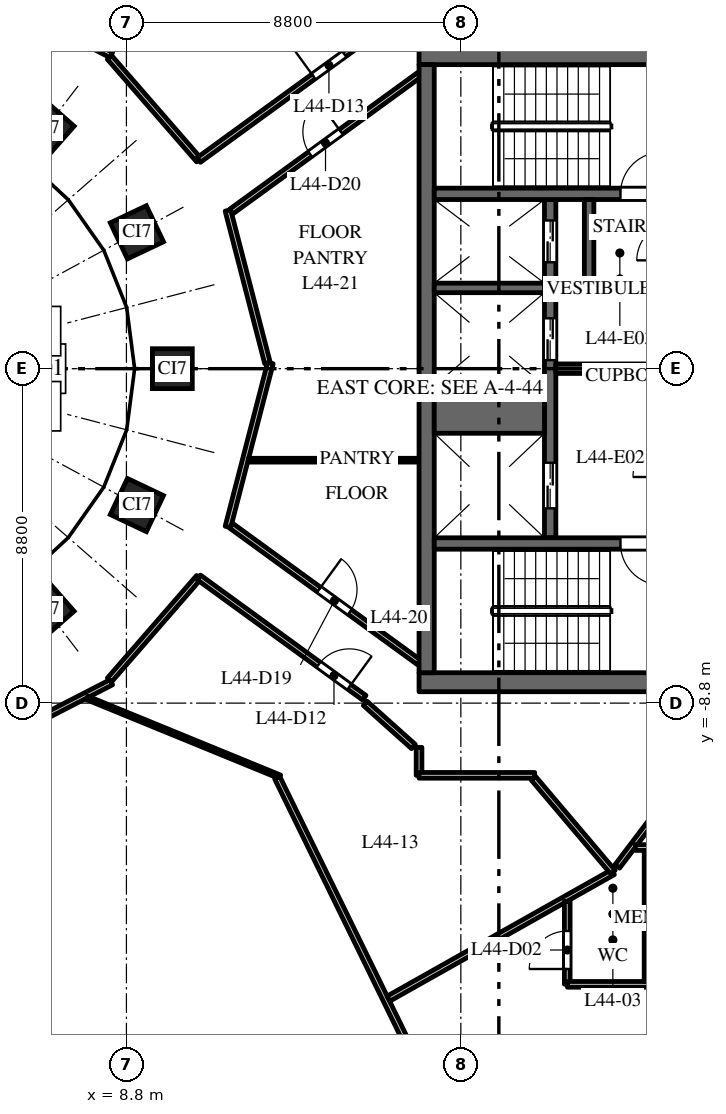
"""IFC4 building model, lengths in metres.
Left out: names, types, materials, properties, quantities, classifications, styles, units other than length and angle.
Written with IfcOpenShell. Run it as: python <this file> out.ifc"""

import sys

from ifc_helpers import new_model, si_unit, direction, frame, frame_2d, origin, origin_2d, place, context, subcontext, project, spatial, rectangle, extrude, element, fill, save


model = new_model("IFC4")
c1 = context("Model", 3, precision=1e-05, world=origin(), true_north=direction((0.0, 1.0)))
c2 = subcontext(c1, "Body", "Model", "MODEL_VIEW")
j1 = project(units=[si_unit("LENGTHUNIT", "METRE"), si_unit("PLANEANGLEUNIT", "RADIAN")], contexts=[c1])
p1 = place(None, origin())
s1 = spatial("IfcSite", under=j1, at=p1, CompositionType="ELEMENT")
p2 = place(p1, origin())
s2 = spatial("IfcBuilding", under=s1, at=p2, CompositionType="ELEMENT")
p3 = place(p2, frame((0.0, 0.0, 190.0)))
s3 = spatial("IfcBuildingStorey", under=s2, at=p3, CompositionType="ELEMENT", Elevation=190.0)
for number, where, z_axis, x_axis in (
    (1, (10.008, 0.0, 0.0), (0.0, 0.0, 1.0), (0.0, 1.0, 0.0)),
    (2, (9.076, 3.588, 0.0), (0.0, 0.0, 1.0), (-0.429, 0.903, 0.0)),
    (3, (6.682, 6.334, 0.0), (0.0, 0.0, 1.0), (-0.751, 0.66, 0.0)),
    (4, (6.682, -6.334, 0.0), (0.0, 0.0, 1.0), (0.751, 0.66, 0.0)),
    (5, (9.076, -3.588, 0.0), (0.0, 0.0, 1.0), (0.429, 0.903, 0.0)),
):
    element("IfcColumn", number, at=place(p3, frame(where, z_axis=z_axis, x_axis=x_axis)), inside=s3, PredefinedType="COLUMN", context=c2, shape_type="SweptSolid", body=[
        extrude(rectangle(XDim=1.05, YDim=1.05, at=origin_2d()), origin(), (0.0, 0.0, 1.0), 4.0),
    ])
p4 = place(p3, frame((16.5, 8.25, 0.0), z_axis=(0.0, 0.0, 1.0), x_axis=(1.0, 0.0, 0.0)))
e6 = element("IfcWall", 6, at=p4, inside=s3, PredefinedType="SHEAR", context=c2, shape_type="SweptSolid", body=[
    extrude(rectangle(XDim=15.0, YDim=0.5, at=frame_2d((7.5, 0.0))), origin(), (0.0, 0.0, 1.0), 3.7),
])
p5 = place(p4, frame((6.9, 0.0, 0.0)))
e7 = element("IfcOpeningElement", 7, at=p5, cuts=e6, PredefinedType="OPENING", context=c2, shape_type="SweptSolid", body=[
    extrude(rectangle(XDim=1.2, YDim=2.1, at=frame_2d((0.6, 1.05))), frame((0.0, 0.26, 0.0), z_axis=(0.0, -1.0, 0.0), x_axis=(1.0, 0.0, 0.0)), (0.0, 0.0, 1.0), 0.52),
])
p6 = place(p4, frame((12.425, 0.0, 0.0)))
e8 = element("IfcOpeningElement", 8, at=p6, cuts=e6, PredefinedType="OPENING", context=c2, shape_type="SweptSolid", body=[
    extrude(rectangle(XDim=0.9, YDim=2.1, at=frame_2d((0.45, 1.05))), frame((0.0, 0.26, 0.0), z_axis=(0.0, -1.0, 0.0), x_axis=(1.0, 0.0, 0.0)), (0.0, 0.0, 1.0), 0.52),
])
p7 = place(p3, frame((16.5, -8.25, 0.0), z_axis=(0.0, 0.0, 1.0), x_axis=(1.0, 0.0, 0.0)))
e9 = element("IfcWall", 9, at=p7, inside=s3, PredefinedType="SHEAR", context=c2, shape_type="SweptSolid", body=[
    extrude(rectangle(XDim=15.0, YDim=0.5, at=frame_2d((7.5, 0.0))), origin(), (0.0, 0.0, 1.0), 3.7),
])
p8 = place(p7, frame((6.9, 0.0, 0.0)))
e10 = element("IfcOpeningElement", 10, at=p8, cuts=e9, PredefinedType="OPENING", context=c2, shape_type="SweptSolid", body=[
    extrude(rectangle(XDim=1.2, YDim=2.1, at=frame_2d((0.6, 1.05))), frame((0.0, 0.26, 0.0), z_axis=(0.0, -1.0, 0.0), x_axis=(1.0, 0.0, 0.0)), (0.0, 0.0, 1.0), 0.52),
])
p9 = place(p7, frame((12.05, 0.0, 0.0)))
e11 = element("IfcOpeningElement", 11, at=p9, cuts=e9, PredefinedType="OPENING", context=c2, shape_type="SweptSolid", body=[
    extrude(rectangle(XDim=0.9, YDim=2.1, at=frame_2d((0.45, 1.05))), frame((0.0, 0.26, 0.0), z_axis=(0.0, -1.0, 0.0), x_axis=(1.0, 0.0, 0.0)), (0.0, 0.0, 1.0), 0.52),
])
p10 = place(p3, frame((19.95, -4.45, 0.0), z_axis=(0.0, 0.0, 1.0), x_axis=(0.0, 1.0, 0.0)))
e12 = element("IfcWall", 12, at=p10, inside=s3, PredefinedType="SHEAR", context=c2, shape_type="SweptSolid", body=[
    extrude(rectangle(XDim=8.9, YDim=0.3, at=frame_2d((4.45, 0.0))), origin(), (0.0, 0.0, 1.0), 3.7),
])
p11 = place(p10, frame((0.775, 0.0, 0.0)))
e13 = element("IfcOpeningElement", 13, at=p11, cuts=e12, PredefinedType="OPENING", context=c2, shape_type="SweptSolid", body=[
    extrude(rectangle(XDim=1.2, YDim=2.1, at=frame_2d((0.6, 1.05))), frame((0.0, 0.16, 0.0), z_axis=(0.0, -1.0, 0.0), x_axis=(1.0, 0.0, 0.0)), (0.0, 0.0, 1.0), 0.32),
])
p12 = place(p10, frame((4.675, 0.0, 0.0)))
e14 = element("IfcOpeningElement", 14, at=p12, cuts=e12, PredefinedType="OPENING", context=c2, shape_type="SweptSolid", body=[
    extrude(rectangle(XDim=1.1, YDim=2.1, at=frame_2d((0.55, 1.05))), frame((0.0, 0.16, 0.0), z_axis=(0.0, -1.0, 0.0), x_axis=(1.0, 0.0, 0.0)), (0.0, 0.0, 1.0), 0.32),
])
p13 = place(p10, frame((7.25, 0.0, 0.0)))
e15 = element("IfcOpeningElement", 15, at=p13, cuts=e12, PredefinedType="OPENING", context=c2, shape_type="SweptSolid", body=[
    extrude(rectangle(XDim=1.1, YDim=2.1, at=frame_2d((0.55, 1.05))), frame((0.0, 0.16, 0.0), z_axis=(0.0, -1.0, 0.0), x_axis=(1.0, 0.0, 0.0)), (0.0, 0.0, 1.0), 0.32),
])
p14 = place(p3, frame((20.1, 0.0, 0.0), z_axis=(0.0, 0.0, 1.0), x_axis=(1.0, 0.0, 0.0)))
e16 = element("IfcWall", 16, at=p14, inside=s3, PredefinedType="SHEAR", context=c2, shape_type="SweptSolid", body=[
    extrude(rectangle(XDim=3.28, YDim=0.25, at=frame_2d((1.64, 0.0))), origin(), (0.0, 0.0, 1.0), 3.7),
])
p15 = place(p3, frame((16.7, -8.0, 0.0), z_axis=(0.0, 0.0, 1.0), x_axis=(0.0, 1.0, 0.0)))
e17 = element("IfcWall", 17, at=p15, inside=s3, PredefinedType="SHEAR", context=c2, shape_type="SweptSolid", body=[
    extrude(rectangle(XDim=16.0, YDim=0.4, at=frame_2d((8.0, 0.0))), origin(), (0.0, 0.0, 1.0), 3.7),
])
p16 = place(p3, frame((16.9, -1.075, 0.0), z_axis=(0.0, 0.0, 1.0), x_axis=(1.0, 0.0, 0.0)))
e18 = element("IfcWall", 18, at=p16, inside=s3, PredefinedType="SHEAR", context=c2, shape_type="SweptSolid", body=[
    extrude(rectangle(XDim=2.9, YDim=1.25, at=frame_2d((1.45, 0.0))), origin(), (0.0, 0.0, 1.0), 3.7),
])
p17 = place(p3, frame((16.9, 2.125, 0.0), z_axis=(0.0, 0.0, 1.0), x_axis=(1.0, 0.0, 0.0)))
e19 = element("IfcWall", 19, at=p17, inside=s3, PredefinedType="SHEAR", context=c2, shape_type="SweptSolid", body=[
    extrude(rectangle(XDim=2.9, YDim=0.25, at=frame_2d((1.45, 0.0))), origin(), (0.0, 0.0, 1.0), 3.7),
])
p18 = place(p3, frame((16.9, 4.6, 0.0), z_axis=(0.0, 0.0, 1.0), x_axis=(1.0, 0.0, 0.0)))
e20 = element("IfcWall", 20, at=p18, inside=s3, PredefinedType="SHEAR", context=c2, shape_type="SweptSolid", body=[
    extrude(rectangle(XDim=6.18, YDim=0.3, at=frame_2d((3.09, 0.0))), origin(), (0.0, 0.0, 1.0), 3.7),
])
p19 = place(p18, frame((4.9, 0.0, 0.0)))
e21 = element("IfcOpeningElement", 21, at=p19, cuts=e20, PredefinedType="OPENING", context=c2, shape_type="SweptSolid", body=[
    extrude(rectangle(XDim=1.1, YDim=2.1, at=frame_2d((0.55, 1.05))), frame((0.0, 0.16, 0.0), z_axis=(0.0, -1.0, 0.0), x_axis=(1.0, 0.0, 0.0)), (0.0, 0.0, 1.0), 0.32),
])
p20 = place(p3, frame((16.9, -4.6, 0.0), z_axis=(0.0, 0.0, 1.0), x_axis=(1.0, 0.0, 0.0)))
e22 = element("IfcWall", 22, at=p20, inside=s3, PredefinedType="SHEAR", context=c2, shape_type="SweptSolid", body=[
    extrude(rectangle(XDim=6.18, YDim=0.3, at=frame_2d((3.09, 0.0))), origin(), (0.0, 0.0, 1.0), 3.7),
])
p21 = place(p20, frame((4.9, 0.0, 0.0)))
e23 = element("IfcOpeningElement", 23, at=p21, cuts=e22, PredefinedType="OPENING", context=c2, shape_type="SweptSolid", body=[
    extrude(rectangle(XDim=1.1, YDim=2.1, at=frame_2d((0.55, 1.05))), frame((0.0, 0.16, 0.0), z_axis=(0.0, -1.0, 0.0), x_axis=(1.0, 0.0, 0.0)), (0.0, 0.0, 1.0), 0.32),
])
p22 = place(p3, frame((20.85, 2.125, 0.0), z_axis=(0.0, 0.0, 1.0), x_axis=(1.0, 0.0, 0.0)))
e24 = element("IfcWall", 24, at=p22, inside=s3, PredefinedType="SHEAR", context=c2, shape_type="SweptSolid", body=[
    extrude(rectangle(XDim=2.53, YDim=0.25, at=frame_2d((1.265, 0.0))), origin(), (0.0, 0.0, 1.0), 3.7),
])
p23 = place(p3, frame((20.975, 2.25, 0.0), z_axis=(0.0, 0.0, 1.0), x_axis=(0.0, 1.0, 0.0)))
e25 = element("IfcWall", 25, at=p23, inside=s3, PredefinedType="SHEAR", context=c2, shape_type="SweptSolid", body=[
    extrude(rectangle(XDim=2.2, YDim=0.25, at=frame_2d((1.1, 0.0))), origin(), (0.0, 0.0, 1.0), 3.7),
])
for number, where, z_axis, x_axis in (
    (26, (4.459, -10.278, 0.0), (0.0, 0.0, 1.0), (0.889, 0.457, 0.0)),
    (27, (4.459, 10.278, 0.0), (0.0, 0.0, 1.0), (0.889, -0.457, 0.0)),
):
    element("IfcWall", number, at=place(p3, frame(where, z_axis=z_axis, x_axis=x_axis)), inside=s3, PredefinedType="PARTITIONING", context=c2, shape_type="SweptSolid", body=[
        extrude(rectangle(XDim=4.434, YDim=0.15, at=frame_2d((2.217, 0.0))), origin(), (0.0, 0.0, 1.0), 2.85),
    ])
p24 = place(p3, frame((7.765, -8.662, 0.0), z_axis=(0.0, 0.0, 1.0), x_axis=(0.925440549198, -0.378892847519, 0.0)))
e28 = element("IfcWall", 28, at=p24, inside=s3, PredefinedType="PARTITIONING", context=c2, shape_type="SweptSolid", body=[
    extrude(rectangle(XDim=5.484, YDim=0.1, at=frame_2d((2.742, 0.0))), origin(), (0.0, 0.0, 1.0), 3.7),
])
for number, where, z_axis, x_axis in (
    (29, (8.355, -8.19, 0.0), (0.0, 0.0, 1.0), (0.656, 0.754, 0.0)),
    (30, (8.355, 8.19, 0.0), (0.0, 0.0, 1.0), (0.656, -0.754, 0.0)),
):
    element("IfcWall", number, at=place(p3, frame(where, z_axis=z_axis, x_axis=x_axis)), inside=s3, PredefinedType="PARTITIONING", context=c2, shape_type="SweptSolid", body=[
        extrude(rectangle(XDim=3.577, YDim=0.15, at=frame_2d((1.789, 0.0))), origin(), (0.0, 0.0, 1.0), 2.75),
    ])
p25 = place(p3, frame((10.703, -5.491, 0.0), z_axis=(0.0, 0.0, 1.0), x_axis=(0.808838005268, -0.588031530816, 0.0)))
e31 = element("IfcWall", 31, at=p25, inside=s3, PredefinedType="PARTITIONING", context=c2, shape_type="SweptSolid", body=[
    extrude(rectangle(XDim=5.386, YDim=0.15, at=frame_2d((2.693, 0.0))), origin(), (0.0, 0.0, 1.0), 2.75),
])
p26 = place(p25, frame((3.9, 0.0, 0.0)))
e32 = element("IfcOpeningElement", 32, at=p26, cuts=e31, PredefinedType="OPENING", context=c2, shape_type="SweptSolid", body=[
    extrude(rectangle(XDim=1.0, YDim=2.1, at=frame_2d((0.5, 1.05))), frame((0.0, 0.085, 0.0), z_axis=(0.0, -1.0, 0.0), x_axis=(1.0, 0.0, 0.0)), (0.0, 0.0, 1.0), 0.17),
])
p27 = place(p3, frame((10.703, 5.491, 0.0), z_axis=(0.0, 0.0, 1.0), x_axis=(0.808838005268, 0.588031530816, 0.0)))
e33 = element("IfcWall", 33, at=p27, inside=s3, PredefinedType="PARTITIONING", context=c2, shape_type="SweptSolid", body=[
    extrude(rectangle(XDim=5.386, YDim=0.15, at=frame_2d((2.693, 0.0))), origin(), (0.0, 0.0, 1.0), 2.75),
])
p28 = place(p27, frame((3.736, 0.0, 0.0)))
e34 = element("IfcOpeningElement", 34, at=p28, cuts=e33, PredefinedType="OPENING", context=c2, shape_type="SweptSolid", body=[
    extrude(rectangle(XDim=1.0, YDim=2.1, at=frame_2d((0.5, 1.05))), frame((0.0, 0.085, 0.0), z_axis=(0.0, -1.0, 0.0), x_axis=(1.0, 0.0, 0.0)), (0.0, 0.0, 1.0), 0.17),
])
p29 = place(p3, frame((11.471, -4.164, 0.0), z_axis=(0.0, 0.0, 1.0), x_axis=(0.250958355571, 0.967997884176, 0.0)))
e35 = element("IfcWall", 35, at=p29, inside=s3, PredefinedType="PARTITIONING", context=c2, shape_type="SweptSolid", body=[
    extrude(rectangle(XDim=4.456, YDim=0.15, at=frame_2d((2.228, 0.0))), origin(), (0.0, 0.0, 1.0), 3.7),
])
p30 = place(p3, frame((11.556, -4.133, 0.0), z_axis=(0.0, 0.0, 1.0), x_axis=(0.808869060288, -0.587988812231, 0.0)))
e36 = element("IfcWall", 36, at=p30, inside=s3, PredefinedType="PARTITIONING", context=c2, shape_type="SweptSolid", body=[
    extrude(rectangle(XDim=6.112, YDim=0.15, at=frame_2d((3.056, 0.0))), origin(), (0.0, 0.0, 1.0), 3.7),
])
p31 = place(p30, frame((2.858, 0.0, 0.0)))
e37 = element("IfcOpeningElement", 37, at=p31, cuts=e36, PredefinedType="OPENING", context=c2, shape_type="SweptSolid", body=[
    extrude(rectangle(XDim=1.0, YDim=2.1, at=frame_2d((0.5, 1.05))), frame((0.0, 0.085, 0.0), z_axis=(0.0, -1.0, 0.0), x_axis=(1.0, 0.0, 0.0)), (0.0, 0.0, 1.0), 0.17),
])
p32 = place(p3, frame((11.471, 4.164, 0.0), z_axis=(0.0, 0.0, 1.0), x_axis=(0.250753789182, -0.968050895982, 0.0)))
e38 = element("IfcWall", 38, at=p32, inside=s3, PredefinedType="PARTITIONING", context=c2, shape_type="SweptSolid", body=[
    extrude(rectangle(XDim=4.148, YDim=0.15, at=frame_2d((2.074, 0.0))), origin(), (0.0, 0.0, 1.0), 3.7),
])
p33 = place(p3, frame((11.556, 4.133, 0.0), z_axis=(0.0, 0.0, 1.0), x_axis=(0.808869060288, 0.587988812231, 0.0)))
e39 = element("IfcWall", 39, at=p33, inside=s3, PredefinedType="PARTITIONING", context=c2, shape_type="SweptSolid", body=[
    extrude(rectangle(XDim=6.112, YDim=0.15, at=frame_2d((3.056, 0.0))), origin(), (0.0, 0.0, 1.0), 3.7),
])
p34 = place(p33, frame((2.57, 0.0, 0.0)))
e40 = element("IfcOpeningElement", 40, at=p34, cuts=e39, PredefinedType="OPENING", context=c2, shape_type="SweptSolid", body=[
    extrude(rectangle(XDim=1.0, YDim=2.1, at=frame_2d((0.5, 1.05))), frame((0.0, 0.085, 0.0), z_axis=(0.0, -1.0, 0.0), x_axis=(1.0, 0.0, 0.0)), (0.0, 0.0, 1.0), 0.17),
])
p35 = place(p3, frame((12.006, -2.408, 0.0), z_axis=(0.0, 0.0, 1.0), x_axis=(1.0, 0.0, 0.0)))
e41 = element("IfcWall", 41, at=p35, inside=s3, PredefinedType="PARTITIONING", context=c2, shape_type="SweptSolid", body=[
    extrude(rectangle(XDim=4.494, YDim=0.1, at=frame_2d((2.247, 0.0))), origin(), (0.0, 0.0, 1.0), 3.7),
])
p36 = place(p3, frame((12.769, -10.765, 0.0), z_axis=(0.0, 0.0, 1.0), x_axis=(0.439230835686, -0.898374238824, 0.0)))
e42 = element("IfcWall", 42, at=p36, inside=s3, PredefinedType="PARTITIONING", context=c2, shape_type="SweptSolid", body=[
    extrude(rectangle(XDim=14.382, YDim=0.15, at=frame_2d((7.191, 0.0))), origin(), (0.0, 0.0, 1.0), 2.9),
])
p37 = place(p3, frame((15.694, -16.577, 0.0), z_axis=(0.0, 0.0, 1.0), x_axis=(0.871255216399, 0.490830263835, 0.0)))
e43 = element("IfcWall", 43, at=p37, inside=s3, PredefinedType="PARTITIONING", context=c2, shape_type="SweptSolid", body=[
    extrude(rectangle(XDim=6.782, YDim=0.15, at=frame_2d((3.391, 0.0))), origin(), (0.0, 0.0, 1.0), 3.7),
])
p38 = place(p3, frame((16.5, -10.7, 0.0), z_axis=(0.0, 0.0, 1.0), x_axis=(0.0, 1.0, 0.0)))
e44 = element("IfcWall", 44, at=p38, inside=s3, PredefinedType="PARTITIONING", context=c2, shape_type="SweptSolid", body=[
    extrude(rectangle(XDim=0.736, YDim=0.15, at=frame_2d((0.368, 0.0))), origin(), (0.0, 0.0, 1.0), 3.7),
])
p39 = place(p3, frame((16.5, -10.7, 0.0), z_axis=(0.0, 0.0, 1.0), x_axis=(1.0, 0.0, 0.0)))
e45 = element("IfcWall", 45, at=p39, inside=s3, PredefinedType="PARTITIONING", context=c2, shape_type="SweptSolid", body=[
    extrude(rectangle(XDim=3.043, YDim=0.15, at=frame_2d((1.521, 0.0))), origin(), (0.0, 0.0, 1.0), 3.7),
])
p40 = place(p3, frame((19.511, -10.778, 0.0), z_axis=(0.0, 0.0, 1.0), x_axis=(0.646314086505, -0.763071491792, 0.0)))
e46 = element("IfcWall", 46, at=p40, inside=s3, PredefinedType="PARTITIONING", context=c2, shape_type="SweptSolid", body=[
    extrude(rectangle(XDim=3.237, YDim=0.15, at=frame_2d((1.618, 0.0))), origin(), (0.0, 0.0, 1.0), 3.7),
])
p41 = place(p3, frame((20.4, -16.196, 0.0), z_axis=(0.0, 0.0, 1.0), x_axis=(0.0, 1.0, 0.0)))
e47 = element("IfcWall", 47, at=p41, inside=s3, PredefinedType="PARTITIONING", context=c2, shape_type="SweptSolid", body=[
    extrude(rectangle(XDim=2.18, YDim=0.15, at=frame_2d((1.09, 0.0))), origin(), (0.0, 0.0, 1.0), 3.7),
])
p42 = place(p41, frame((0.4, 0.0, 0.0)))
e48 = element("IfcOpeningElement", 48, at=p42, cuts=e47, PredefinedType="OPENING", context=c2, shape_type="SweptSolid", body=[
    extrude(rectangle(XDim=1.0, YDim=2.1, at=frame_2d((0.5, 1.05))), frame((0.0, 0.085, 0.0), z_axis=(0.0, -1.0, 0.0), x_axis=(1.0, 0.0, 0.0)), (0.0, 0.0, 1.0), 0.17),
])
p43 = place(p3, frame((20.404, -16.2, 0.0), z_axis=(0.0, 0.0, 1.0), x_axis=(1.0, 0.0, 0.0)))
e49 = element("IfcWall", 49, at=p43, inside=s3, PredefinedType="PARTITIONING", context=c2, shape_type="SweptSolid", body=[
    extrude(rectangle(XDim=5.946, YDim=0.15, at=frame_2d((2.973, 0.0))), origin(), (0.0, 0.0, 1.0), 3.7),
])
p44 = place(p43, frame((2.656, 0.0, 0.0)))
e50 = element("IfcOpeningElement", 50, at=p44, cuts=e49, PredefinedType="OPENING", context=c2, shape_type="SweptSolid", body=[
    extrude(rectangle(XDim=1.0, YDim=2.1, at=frame_2d((0.5, 1.05))), frame((0.0, 0.085, 0.0), z_axis=(0.0, -1.0, 0.0), x_axis=(1.0, 0.0, 0.0)), (0.0, 0.0, 1.0), 0.17),
])
p45 = place(p43, frame((4.546, 0.0, 0.0)))
e51 = element("IfcOpeningElement", 51, at=p45, cuts=e49, PredefinedType="OPENING", context=c2, shape_type="SweptSolid", body=[
    extrude(rectangle(XDim=1.0, YDim=2.1, at=frame_2d((0.5, 1.05))), frame((0.0, 0.085, 0.0), z_axis=(0.0, -1.0, 0.0), x_axis=(1.0, 0.0, 0.0)), (0.0, 0.0, 1.0), 0.17),
])
p46 = place(p3, frame((21.716, -13.098, 0.0), z_axis=(0.0, 0.0, 1.0), x_axis=(0.603132715751, 0.797640851004, 0.0)))
e52 = element("IfcWall", 52, at=p46, inside=s3, PredefinedType="PARTITIONING", context=c2, shape_type="SweptSolid", body=[
    extrude(rectangle(XDim=3.1, YDim=0.15, at=frame_2d((1.55, 0.0))), origin(), (0.0, 0.0, 1.0), 2.75),
])
p47 = place(p3, frame((22.191, -12.6, 0.0), z_axis=(0.0, 0.0, 1.0), x_axis=(1.0, 0.0, 0.0)))
e53 = element("IfcWall", 53, at=p47, inside=s3, PredefinedType="PARTITIONING", context=c2, shape_type="SweptSolid", body=[
    extrude(rectangle(XDim=4.159, YDim=0.15, at=frame_2d((2.08, 0.0))), origin(), (0.0, 0.0, 1.0), 2.75),
])
p48 = place(p3, frame((22.5, -16.125, 0.0), z_axis=(0.0, 0.0, 1.0), x_axis=(0.0, 1.0, 0.0)))
e54 = element("IfcWall", 54, at=p48, inside=s3, PredefinedType="PARTITIONING", context=c2, shape_type="SweptSolid", body=[
    extrude(rectangle(XDim=3.45, YDim=0.15, at=frame_2d((1.725, 0.0))), origin(), (0.0, 0.0, 1.0), 3.7),
])
p49 = place(p3, frame((16.352, -9.942, 0.0), z_axis=(0.0, 0.0, 1.0), x_axis=(-0.744832366149, 0.667251636444, 0.0)))
e55 = element("IfcWall", 55, at=p49, inside=s3, PredefinedType="PARTITIONING", context=c2, shape_type="SweptSolid", body=[
    extrude(rectangle(XDim=1.702, YDim=0.15, at=frame_2d((0.851, 0.0))), origin(), (0.0, 0.0, 1.0), 3.7),
])
p50 = place(p11, origin())
e56 = element("IfcDoor", 56, at=p50, inside=s3, OperationType="DOUBLE_DOOR_SLIDING", PredefinedType="DOOR", context=c2, shape_type="SweptSolid", body=[
    extrude(rectangle(XDim=1.2, YDim=2.1, at=frame_2d((0.6, 1.05))), frame((0.0, 0.025, 0.0), z_axis=(0.0, -1.0, 0.0), x_axis=(1.0, 0.0, 0.0)), (0.0, 0.0, 1.0), 0.05),
])
fill(e13, e56)
p51 = place(p12, origin())
e57 = element("IfcDoor", 57, at=p51, inside=s3, OperationType="DOUBLE_DOOR_SLIDING", PredefinedType="DOOR", context=c2, shape_type="SweptSolid", body=[
    extrude(rectangle(XDim=1.1, YDim=2.1, at=frame_2d((0.55, 1.05))), frame((0.0, 0.025, 0.0), z_axis=(0.0, -1.0, 0.0), x_axis=(1.0, 0.0, 0.0)), (0.0, 0.0, 1.0), 0.05),
])
fill(e14, e57)
p52 = place(p13, origin())
e58 = element("IfcDoor", 58, at=p52, inside=s3, OperationType="DOUBLE_DOOR_SLIDING", PredefinedType="DOOR", context=c2, shape_type="SweptSolid", body=[
    extrude(rectangle(XDim=1.1, YDim=2.1, at=frame_2d((0.55, 1.05))), frame((0.0, 0.025, 0.0), z_axis=(0.0, -1.0, 0.0), x_axis=(1.0, 0.0, 0.0)), (0.0, 0.0, 1.0), 0.05),
])
fill(e15, e58)
p53 = place(p19, origin())
e59 = element("IfcDoor", 59, at=p53, inside=s3, OperationType="SINGLE_SWING_LEFT", PredefinedType="DOOR", context=c2, shape_type="SweptSolid", body=[
    extrude(rectangle(XDim=1.1, YDim=2.1, at=frame_2d((0.55, 1.05))), frame((0.0, 0.025, 0.0), z_axis=(0.0, -1.0, 0.0), x_axis=(1.0, 0.0, 0.0)), (0.0, 0.0, 1.0), 0.05),
])
fill(e21, e59)
p54 = place(p21, origin())
e60 = element("IfcDoor", 60, at=p54, inside=s3, OperationType="SINGLE_SWING_RIGHT", PredefinedType="DOOR", context=c2, shape_type="SweptSolid", body=[
    extrude(rectangle(XDim=1.1, YDim=2.1, at=frame_2d((0.55, 1.05))), frame((0.0, 0.025, 0.0), z_axis=(0.0, -1.0, 0.0), x_axis=(1.0, 0.0, 0.0)), (0.0, 0.0, 1.0), 0.05),
])
fill(e23, e60)
p55 = place(p42, origin())
e61 = element("IfcDoor", 61, at=p55, inside=s3, OperationType="SINGLE_SWING_LEFT", PredefinedType="DOOR", context=c2, shape_type="SweptSolid", body=[
    extrude(rectangle(XDim=1.0, YDim=2.1, at=frame_2d((0.5, 1.05))), frame((0.0, 0.025, 0.0), z_axis=(0.0, -1.0, 0.0), x_axis=(1.0, 0.0, 0.0)), (0.0, 0.0, 1.0), 0.05),
])
fill(e48, e61)
p56 = place(p26, origin())
e62 = element("IfcDoor", 62, at=p56, inside=s3, OperationType="SINGLE_SWING_RIGHT", PredefinedType="DOOR", context=c2, shape_type="SweptSolid", body=[
    extrude(rectangle(XDim=1.0, YDim=2.1, at=frame_2d((0.5, 1.05))), frame((0.0, 0.025, 0.0), z_axis=(0.0, -1.0, 0.0), x_axis=(1.0, 0.0, 0.0)), (0.0, 0.0, 1.0), 0.05),
])
fill(e32, e62)
p57 = place(p28, origin())
e63 = element("IfcDoor", 63, at=p57, inside=s3, OperationType="SINGLE_SWING_LEFT", PredefinedType="DOOR", context=c2, shape_type="SweptSolid", body=[
    extrude(rectangle(XDim=1.0, YDim=2.1, at=frame_2d((0.5, 1.05))), frame((0.0, 0.025, 0.0), z_axis=(0.0, -1.0, 0.0), x_axis=(1.0, 0.0, 0.0)), (0.0, 0.0, 1.0), 0.05),
])
fill(e34, e63)
p58 = place(p31, origin())
e64 = element("IfcDoor", 64, at=p58, inside=s3, OperationType="SINGLE_SWING_LEFT", PredefinedType="DOOR", context=c2, shape_type="SweptSolid", body=[
    extrude(rectangle(XDim=1.0, YDim=2.1, at=frame_2d((0.5, 1.05))), frame((0.0, 0.025, 0.0), z_axis=(0.0, -1.0, 0.0), x_axis=(1.0, 0.0, 0.0)), (0.0, 0.0, 1.0), 0.05),
])
fill(e37, e64)
p59 = place(p34, origin())
e65 = element("IfcDoor", 65, at=p59, inside=s3, OperationType="SINGLE_SWING_RIGHT", PredefinedType="DOOR", context=c2, shape_type="SweptSolid", body=[
    extrude(rectangle(XDim=1.0, YDim=2.1, at=frame_2d((0.5, 1.05))), frame((0.0, 0.025, 0.0), z_axis=(0.0, -1.0, 0.0), x_axis=(1.0, 0.0, 0.0)), (0.0, 0.0, 1.0), 0.05),
])
fill(e40, e65)
save(model, sys.argv[1])
